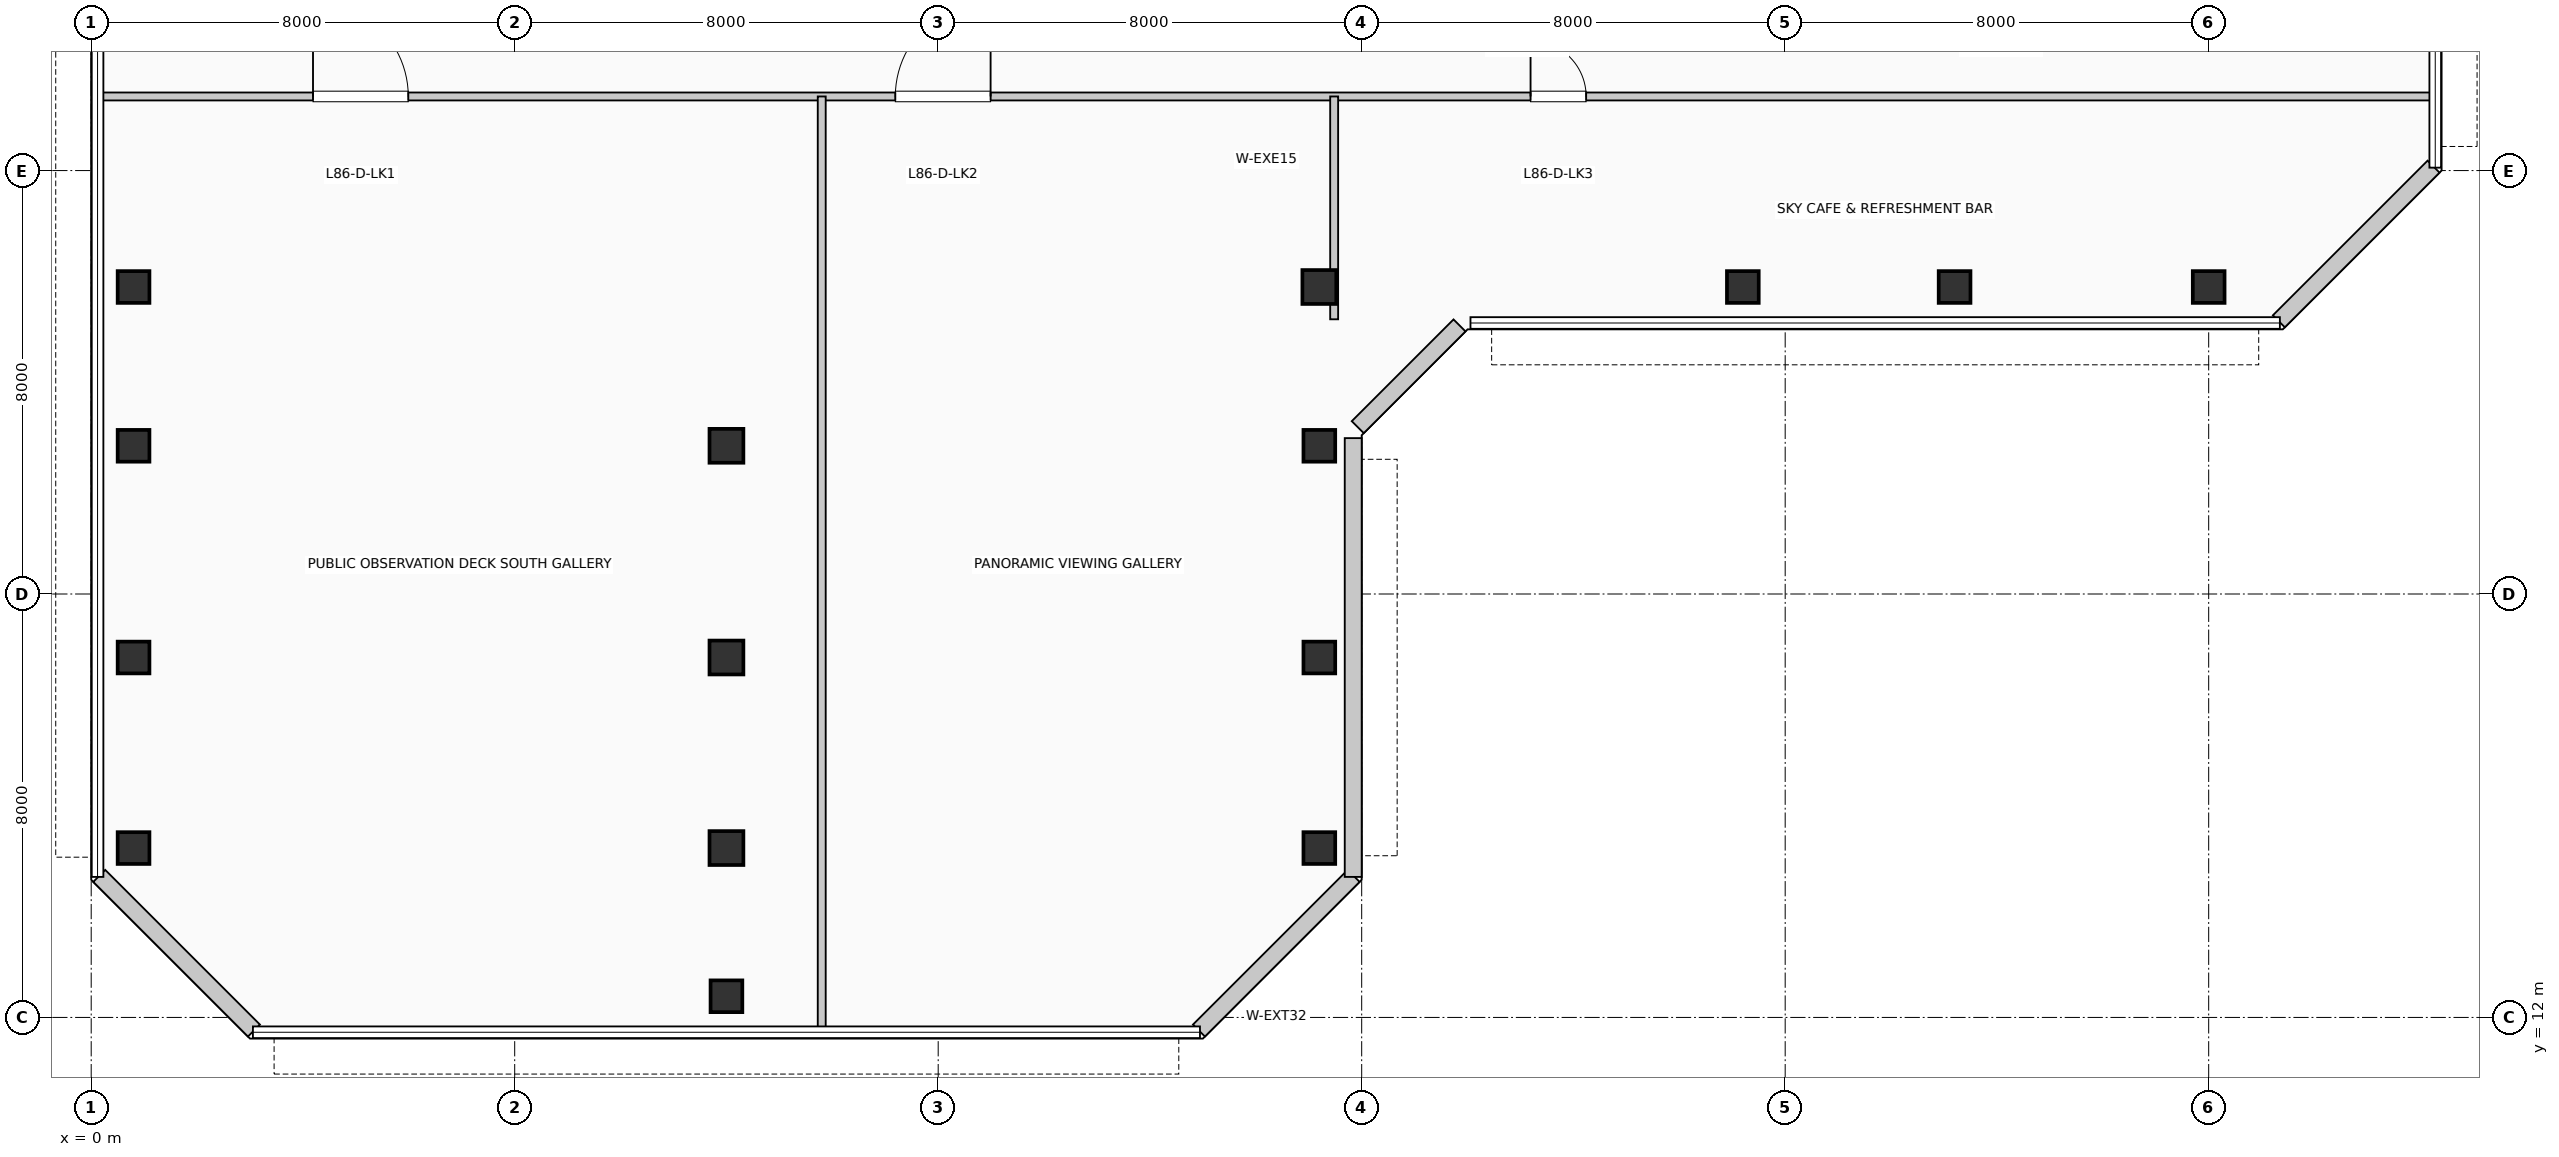
"""IFC4 building model, lengths in metres.
Left out: names, types, materials, properties, quantities, classifications, styles, units other than length and angle.
Written with IfcOpenShell. Run it as: python <this file> out.ifc"""

import sys

from ifc_helpers import new_model, si_unit, direction, frame, frame_2d, origin, origin_2d, place, context, subcontext, project, spatial, rectangle, extrude, element, fill, save


model = new_model("IFC4")
c1 = context("Model", 3, precision=1e-05, world=origin(), true_north=direction((0.0, 1.0)))
c2 = subcontext(c1, "Body", "Model", "MODEL_VIEW")
j1 = project(units=[si_unit("LENGTHUNIT", "METRE"), si_unit("PLANEANGLEUNIT", "RADIAN")], contexts=[c1])
p1 = place(None, origin())
s1 = spatial("IfcSite", under=j1, at=p1, CompositionType="ELEMENT")
p2 = place(p1, origin())
s2 = spatial("IfcBuilding", under=s1, at=p2, CompositionType="ELEMENT")
p3 = place(p2, frame((0.0, 0.0, 352.11)))
s3 = spatial("IfcBuildingStorey", under=s2, at=p3, CompositionType="ELEMENT", Elevation=352.11)
for number, where, z_axis, x_axis in (
    (1, (0.8, 15.2, 0.0), (0.0, 0.0, 1.0), (1.0, 0.0, 0.0)),
    (2, (0.8, 18.8, 0.0), (0.0, 0.0, 1.0), (1.0, 0.0, 0.0)),
    (3, (0.8, 22.8, 0.0), (0.0, 0.0, 1.0), (1.0, 0.0, 0.0)),
    (4, (0.8, 25.8, 0.0), (0.0, 0.0, 1.0), (1.0, 0.0, 0.0)),
    (5, (12.0, 12.4, 0.0), (0.0, 0.0, 1.0), (1.0, 0.0, 0.0)),
):
    element("IfcColumn", number, at=place(p3, frame(where, z_axis=z_axis, x_axis=x_axis)), inside=s3, PredefinedType="COLUMN", context=c2, shape_type="SweptSolid", body=[
        extrude(rectangle(XDim=0.6, YDim=0.6, at=origin_2d()), origin(), (0.0, 0.0, 1.0), 4.62),
    ])
for number, where, z_axis, x_axis in (
    (6, (12.0, 15.2, 0.0), (0.0, 0.0, 1.0), (1.0, 0.0, 0.0)),
    (7, (12.0, 18.8, 0.0), (0.0, 0.0, 1.0), (1.0, 0.0, 0.0)),
    (8, (12.0, 22.8, 0.0), (0.0, 0.0, 1.0), (1.0, 0.0, 0.0)),
):
    element("IfcColumn", number, at=place(p3, frame(where, z_axis=z_axis, x_axis=x_axis)), inside=s3, PredefinedType="COLUMN", context=c2, shape_type="SweptSolid", body=[
        extrude(rectangle(XDim=0.64, YDim=0.64, at=origin_2d()), origin(), (0.0, 0.0, 1.0), 4.62),
    ])
for number, where, z_axis, x_axis in (
    (9, (23.2, 15.2, 0.0), (0.0, 0.0, 1.0), (1.0, 0.0, 0.0)),
    (10, (23.2, 18.8, 0.0), (0.0, 0.0, 1.0), (1.0, 0.0, 0.0)),
    (11, (23.2, 22.8, 0.0), (0.0, 0.0, 1.0), (1.0, 0.0, 0.0)),
):
    element("IfcColumn", number, at=place(p3, frame(where, z_axis=z_axis, x_axis=x_axis)), inside=s3, PredefinedType="COLUMN", context=c2, shape_type="SweptSolid", body=[
        extrude(rectangle(XDim=0.6, YDim=0.6, at=origin_2d()), origin(), (0.0, 0.0, 1.0), 4.62),
    ])
p4 = place(p3, frame((23.2, 25.8, 0.0), z_axis=(0.0, 0.0, 1.0), x_axis=(1.0, 0.0, 0.0)))
e12 = element("IfcColumn", 12, at=p4, inside=s3, PredefinedType="COLUMN", context=c2, shape_type="SweptSolid", body=[
    extrude(rectangle(XDim=0.64, YDim=0.64, at=origin_2d()), origin(), (0.0, 0.0, 1.0), 4.62),
])
for number, where, z_axis, x_axis in (
    (13, (31.2, 25.8, 0.0), (0.0, 0.0, 1.0), (1.0, 0.0, 0.0)),
    (14, (35.2, 25.8, 0.0), (0.0, 0.0, 1.0), (1.0, 0.0, 0.0)),
    (15, (40.0, 25.8, 0.0), (0.0, 0.0, 1.0), (1.0, 0.0, 0.0)),
):
    element("IfcColumn", number, at=place(p3, frame(where, z_axis=z_axis, x_axis=x_axis)), inside=s3, PredefinedType="COLUMN", context=c2, shape_type="SweptSolid", body=[
        extrude(rectangle(XDim=0.6, YDim=0.6, at=origin_2d()), origin(), (0.0, 0.0, 1.0), 4.62),
    ])
p5 = place(p3, frame((20.926, 11.752, 0.0), z_axis=(0.0, 0.0, 1.0), x_axis=(0.707077242712, 0.707136318428, 0.0)))
e16 = element("IfcWall", 16, at=p5, inside=s3, PredefinedType="SOLIDWALL", context=c2, shape_type="SweptSolid", body=[
    extrude(rectangle(XDim=4.133, YDim=0.32, at=frame_2d((2.066, 0.0))), origin(), (0.0, 0.0, 1.0), 4.37),
])
p6 = place(p3, frame((23.84, 14.655, 0.0), z_axis=(0.0, 0.0, 1.0), x_axis=(0.0, 1.0, 0.0)))
e17 = element("IfcWall", 17, at=p6, inside=s3, PredefinedType="SOLIDWALL", context=c2, shape_type="SweptSolid", body=[
    extrude(rectangle(XDim=8.29, YDim=0.32, at=frame_2d((4.145, 0.0))), origin(), (0.0, 0.0, 1.0), 4.37),
])
p7 = place(p3, frame((23.926, 23.152, 0.0), z_axis=(0.0, 0.0, 1.0), x_axis=(0.707106781187, 0.707106781187, 0.0)))
e18 = element("IfcWall", 18, at=p7, inside=s3, PredefinedType="SOLIDWALL", context=c2, shape_type="SweptSolid", body=[
    extrude(rectangle(XDim=2.718, YDim=0.32, at=frame_2d((1.359, 0.0))), origin(), (0.0, 0.0, 1.0), 4.37),
])
for number, where, z_axis, x_axis in (
    (19, (41.326, 25.152, 0.0), (0.0, 0.0, 1.0), (0.707, 0.707, 0.0)),
    (20, (0.152, 14.674, 0.0), (0.0, 0.0, 1.0), (0.707, -0.707, 0.0)),
):
    element("IfcWall", number, at=place(p3, frame(where, z_axis=z_axis, x_axis=x_axis)), inside=s3, PredefinedType="SOLIDWALL", context=c2, shape_type="SweptSolid", body=[
        extrude(rectangle(XDim=4.133, YDim=0.32, at=frame_2d((2.066, 0.0))), origin(), (0.0, 0.0, 1.0), 4.37),
    ])
p8 = place(p3, frame((0.19, 29.4, 0.0), z_axis=(0.0, 0.0, 1.0), x_axis=(1.0, 0.0, 0.0)))
e21 = element("IfcWall", 21, at=p8, inside=s3, PredefinedType="PARTITIONING", context=c2, shape_type="SweptSolid", body=[
    extrude(rectangle(XDim=44.02, YDim=0.15, at=frame_2d((22.01, 0.0))), origin(), (0.0, 0.0, 1.0), 4.055),
])
p9 = place(p8, frame((4.0, 0.0, 0.0)))
e22 = element("IfcOpeningElement", 22, at=p9, cuts=e21, PredefinedType="OPENING", context=c2, shape_type="SweptSolid", body=[
    extrude(rectangle(XDim=1.8, YDim=2.3, at=frame_2d((0.9, 1.15))), frame((0.0, 0.085, 0.0), z_axis=(0.0, -1.0, 0.0), x_axis=(1.0, 0.0, 0.0)), (0.0, 0.0, 1.0), 0.17),
])
p10 = place(p8, frame((15.0, 0.0, 0.0)))
e23 = element("IfcOpeningElement", 23, at=p10, cuts=e21, PredefinedType="OPENING", context=c2, shape_type="SweptSolid", body=[
    extrude(rectangle(XDim=1.8, YDim=2.3, at=frame_2d((0.9, 1.15))), frame((0.0, 0.085, 0.0), z_axis=(0.0, -1.0, 0.0), x_axis=(1.0, 0.0, 0.0)), (0.0, 0.0, 1.0), 0.17),
])
p11 = place(p8, frame((27.0, 0.0, 0.0)))
e24 = element("IfcOpeningElement", 24, at=p11, cuts=e21, PredefinedType="OPENING", context=c2, shape_type="SweptSolid", body=[
    extrude(rectangle(XDim=1.05, YDim=2.15, at=frame_2d((0.525, 1.075))), frame((0.0, 0.085, 0.0), z_axis=(0.0, -1.0, 0.0), x_axis=(1.0, 0.0, 0.0)), (0.0, 0.0, 1.0), 0.17),
])
p12 = place(p3, frame((13.8, 11.79, 0.0), z_axis=(0.0, 0.0, 1.0), x_axis=(0.0, 1.0, 0.0)))
e25 = element("IfcWall", 25, at=p12, inside=s3, PredefinedType="PARTITIONING", context=c2, shape_type="SweptSolid", body=[
    extrude(rectangle(XDim=17.61, YDim=0.15, at=frame_2d((8.805, 0.0))), origin(), (0.0, 0.0, 1.0), 4.37),
])
p13 = place(p3, frame((23.48, 25.19, 0.0), z_axis=(0.0, 0.0, 1.0), x_axis=(0.0, 1.0, 0.0)))
e26 = element("IfcWall", 26, at=p13, inside=s3, PredefinedType="PARTITIONING", context=c2, shape_type="SweptSolid", body=[
    extrude(rectangle(XDim=4.21, YDim=0.15, at=frame_2d((2.105, 0.0))), origin(), (0.0, 0.0, 1.0), 3.855),
])
p14 = place(p9, origin())
e27 = element("IfcDoor", 27, at=p14, inside=s3, OperationType="SINGLE_SWING_LEFT", PredefinedType="DOOR", context=c2, shape_type="SweptSolid", body=[
    extrude(rectangle(XDim=1.8, YDim=2.3, at=frame_2d((0.9, 1.15))), frame((0.0, 0.025, 0.0), z_axis=(0.0, -1.0, 0.0), x_axis=(1.0, 0.0, 0.0)), (0.0, 0.0, 1.0), 0.05),
])
fill(e22, e27)
p15 = place(p10, origin())
e28 = element("IfcDoor", 28, at=p15, inside=s3, OperationType="SINGLE_SWING_RIGHT", PredefinedType="DOOR", context=c2, shape_type="SweptSolid", body=[
    extrude(rectangle(XDim=1.8, YDim=2.3, at=frame_2d((0.9, 1.15))), frame((0.0, 0.025, 0.0), z_axis=(0.0, -1.0, 0.0), x_axis=(1.0, 0.0, 0.0)), (0.0, 0.0, 1.0), 0.05),
])
fill(e23, e28)
p16 = place(p11, origin())
e29 = element("IfcDoor", 29, at=p16, inside=s3, OperationType="SINGLE_SWING_LEFT", PredefinedType="DOOR", context=c2, shape_type="SweptSolid", body=[
    extrude(rectangle(XDim=1.05, YDim=2.15, at=frame_2d((0.525, 1.075))), frame((0.0, 0.025, 0.0), z_axis=(0.0, -1.0, 0.0), x_axis=(1.0, 0.0, 0.0)), (0.0, 0.0, 1.0), 0.05),
])
fill(e24, e29)
save(model, sys.argv[1])
